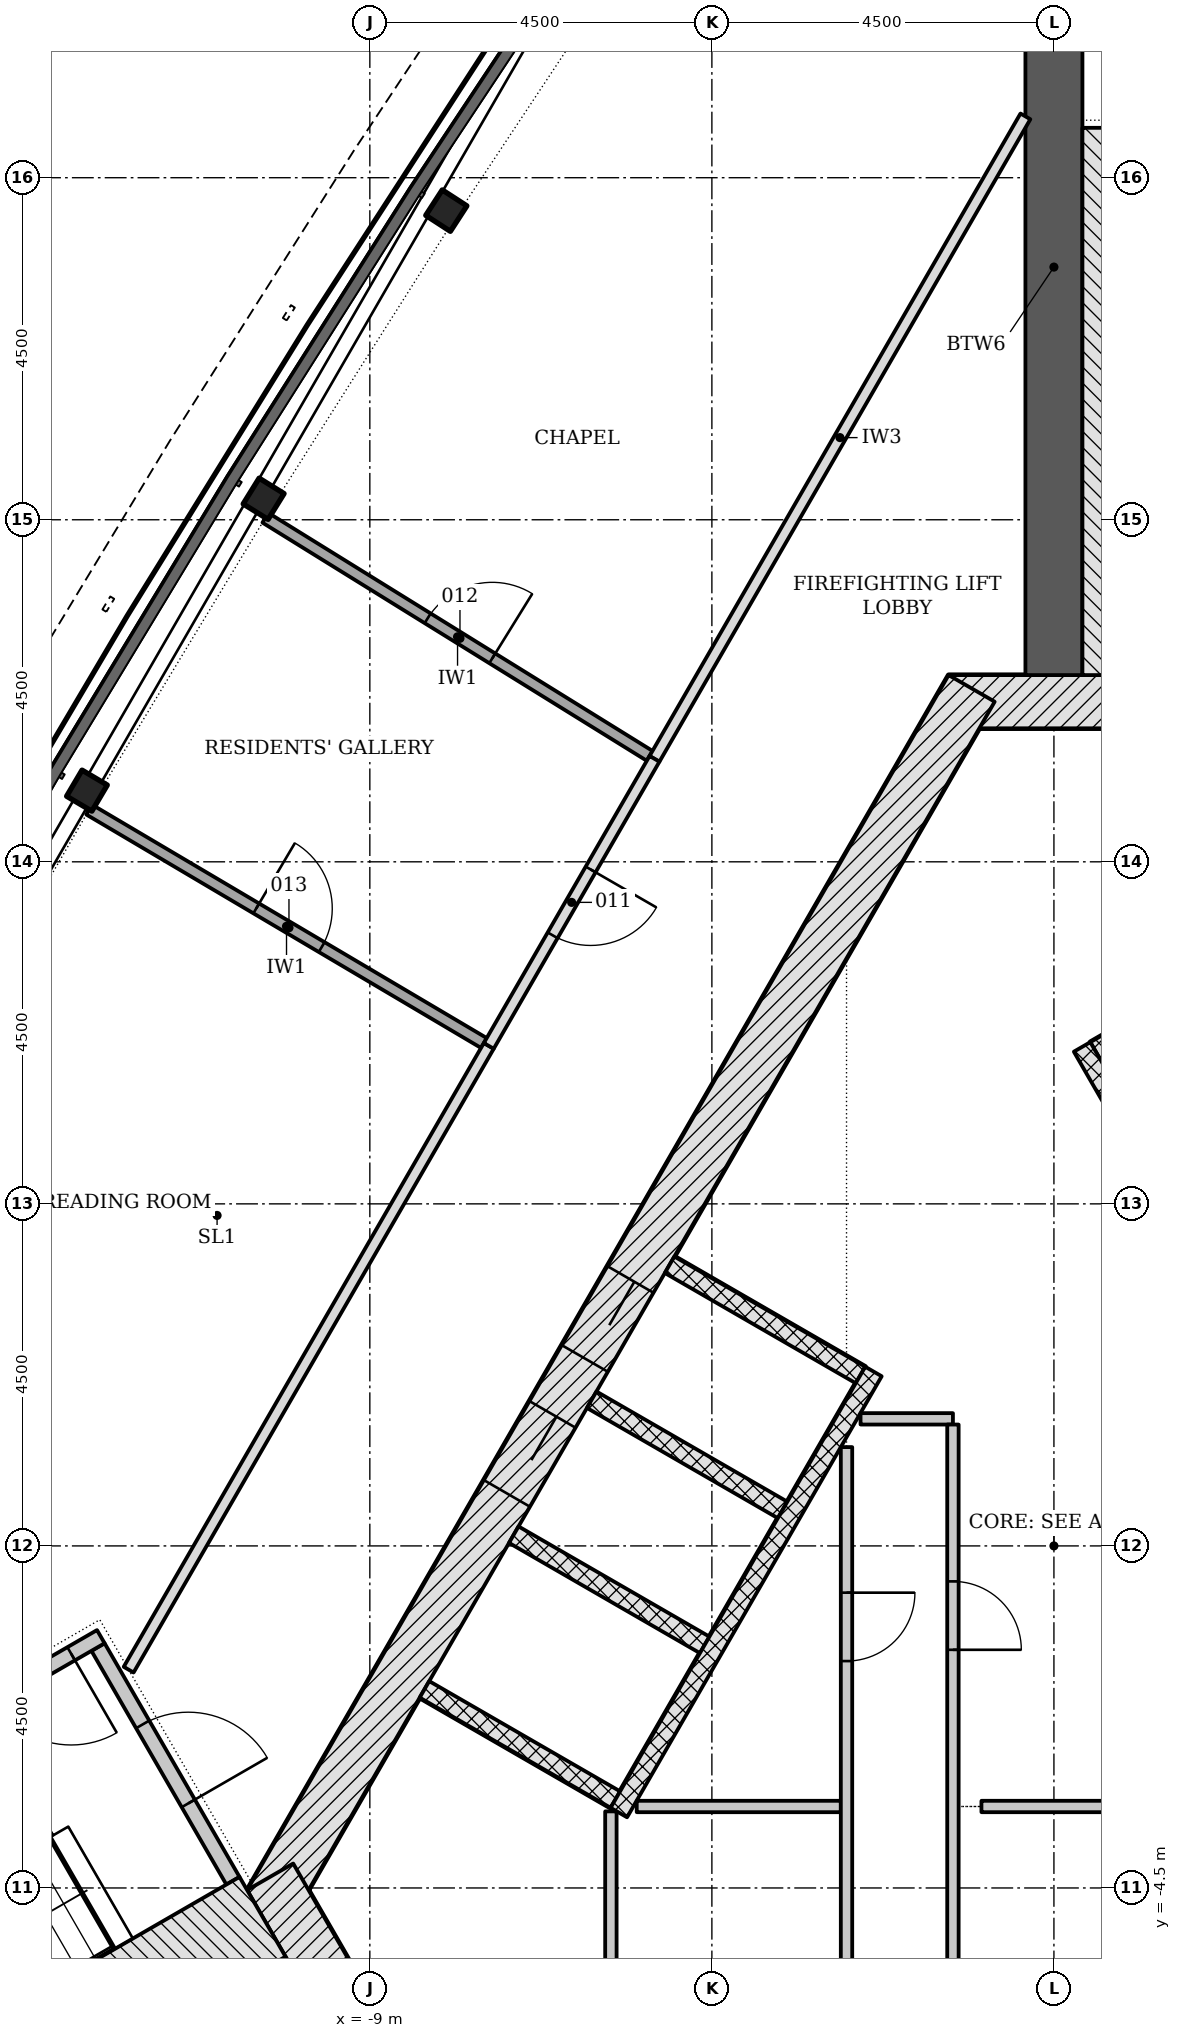
"""IFC4 building model, lengths in metres.
Left out: names, types, materials, properties, quantities, classifications, styles, units other than length and angle.
Written with IfcOpenShell. Run it as: python <this file> out.ifc"""

import sys

from ifc_helpers import new_model, si_unit, direction, frame, frame_2d, origin, origin_2d, place, context, subcontext, project, spatial, rectangle, i_section, extrude, element, fill, save


model = new_model("IFC4")
c1 = context("Model", 3, precision=1e-05, world=origin(), true_north=direction((0.0, 1.0)))
c2 = subcontext(c1, "Body", "Model", "MODEL_VIEW")
j1 = project(units=[si_unit("LENGTHUNIT", "METRE"), si_unit("PLANEANGLEUNIT", "RADIAN")], contexts=[c1])
p1 = place(None, origin())
s1 = spatial("IfcSite", under=j1, at=p1, CompositionType="ELEMENT")
p2 = place(p1, origin())
s2 = spatial("IfcBuilding", under=s1, at=p2, CompositionType="ELEMENT")
p3 = place(p2, frame((0.0, 0.0, 150.9)))
s3 = spatial("IfcBuildingStorey", under=s2, at=p3, CompositionType="ELEMENT", Elevation=150.9)
p4 = place(p3, frame((1.386, 11.106, -0.2), z_axis=(0.0, 0.0, 1.0), x_axis=(-1.0, 0.0, 0.0)))
e1 = element("IfcWall", 1, at=p4, inside=s3, PredefinedType="SHEAR", context=c2, shape_type="SweptSolid", body=[
    extrude(rectangle(XDim=2.771, YDim=0.7, at=frame_2d((1.386, 0.0))), origin(), (0.0, 0.0, 1.0), 3.6),
])
p5 = place(p3, frame((-1.083, 11.281, -0.2), z_axis=(0.0, 0.0, 1.0), x_axis=(-0.500001446645, -0.866024568562, 0.0)))
e2 = element("IfcWall", 2, at=p5, inside=s3, PredefinedType="SHEAR", context=c2, shape_type="SweptSolid", body=[
    extrude(rectangle(XDim=18.458, YDim=0.7, at=frame_2d((9.229, 0.0))), origin(), (0.0, 0.0, 1.0), 3.6),
])
p6 = place(p5, frame((8.979, 0.0, 0.2)))
e3 = element("IfcOpeningElement", 3, at=p6, cuts=e2, PredefinedType="OPENING", context=c2, shape_type="SweptSolid", body=[
    extrude(rectangle(XDim=1.2, YDim=2.1, at=frame_2d((0.6, 1.05))), frame((0.0, 0.36, 0.0), z_axis=(0.0, -1.0, 0.0), x_axis=(1.0, 0.0, 0.0)), (0.0, 0.0, 1.0), 0.72),
])
p7 = place(p5, frame((11.029, 0.0, 0.2)))
e4 = element("IfcOpeningElement", 4, at=p7, cuts=e2, PredefinedType="OPENING", context=c2, shape_type="SweptSolid", body=[
    extrude(rectangle(XDim=1.2, YDim=2.1, at=frame_2d((0.6, 1.05))), frame((0.0, 0.36, 0.0), z_axis=(0.0, -1.0, 0.0), x_axis=(1.0, 0.0, 0.0)), (0.0, 0.0, 1.0), 0.72),
])
p8 = place(p3, frame((-10.311, -4.353, -0.2), z_axis=(0.0, 0.0, 1.0), x_axis=(0.500042739161, -0.866000726912, 0.0)))
e5 = element("IfcWall", 5, at=p8, inside=s3, PredefinedType="SHEAR", context=c2, shape_type="SweptSolid", body=[
    extrude(rectangle(XDim=2.771, YDim=0.7, at=frame_2d((1.386, 0.0))), origin(), (0.0, 0.0, 1.0), 3.6),
])
p9 = place(p3, frame((0.0, 11.456, -0.2), z_axis=(0.0, 0.0, 1.0), x_axis=(0.0, 1.0, 0.0)))
e6 = element("IfcWall", 6, at=p9, inside=s3, PredefinedType="SHEAR", context=c2, shape_type="SweptSolid", body=[
    extrude(rectangle(XDim=10.736, YDim=0.75, at=frame_2d((5.368, 0.0))), origin(), (0.0, 0.0, 1.0), 3.6),
])
p10 = place(p3, frame((-9.922, -5.728, -0.2), z_axis=(0.0, 0.0, 1.0), x_axis=(-0.86602614826, -0.499998710529, 0.0)))
e7 = element("IfcWall", 7, at=p10, inside=s3, PredefinedType="SHEAR", context=c2, shape_type="SweptSolid", body=[
    extrude(rectangle(XDim=10.735, YDim=0.75, at=frame_2d((5.368, 0.0))), origin(), (0.0, 0.0, 1.0), 3.6),
])
for number, where, z_axis, x_axis in (
    (8, (-7.994, 17.567, -0.2), (0.0, 0.0, 1.0), (-0.544, -0.839, 0.0)),
    (9, (-10.397, 13.776, -0.2), (0.0, 0.0, 1.0), (-0.527, -0.85, 0.0)),
    (10, (-12.722, 9.936, -0.2), (0.0, 0.0, 1.0), (-0.509, -0.861, 0.0)),
):
    element("IfcColumn", number, at=place(p3, frame(where, z_axis=z_axis, x_axis=x_axis)), inside=s3, PredefinedType="COLUMN", context=c2, shape_type="SweptSolid", body=[
        extrude(i_section(OverallWidth=0.399, OverallDepth=0.386, WebThickness=0.021, FlangeThickness=0.033, FilletRadius=0.015, at=origin_2d()), origin(), (0.0, 0.0, 1.0), 3.6),
    ])
p11 = place(p3, frame((2.706, 7.769, -0.2), z_axis=(0.0, 0.0, 1.0), x_axis=(-0.866022959057, -0.500004234368, 0.0)))
e11 = element("IfcWall", 11, at=p11, inside=s3, PredefinedType="PARTITIONING", context=c2, shape_type="SweptSolid", body=[
    extrude(rectangle(XDim=2.5, YDim=0.25, at=frame_2d((1.25, 0.0))), origin(), (0.0, 0.0, 1.0), 3.6),
])
p12 = place(p3, frame((5.87, -2.961, 0.0), z_axis=(0.0, 0.0, 1.0), x_axis=(-0.50000615651, 0.866021849293, 0.0)))
e12 = element("IfcWall", 12, at=p12, inside=s3, PredefinedType="PARTITIONING", context=c2, shape_type="SweptSolid", body=[
    extrude(rectangle(XDim=11.0, YDim=0.25, at=frame_2d((5.5, 0.0))), origin(), (0.0, 0.0, 1.0), 3.4),
])
for number, where, z_axis, x_axis in (
    (13, (-5.056, 3.699, -0.2), (0.0, 0.0, 1.0), (0.866, -0.5, 0.0)),
    (14, (-6.081, 1.923, -0.2), (0.0, 0.0, 1.0), (0.866, -0.5, 0.0)),
    (15, (-7.106, 0.148, -0.2), (0.0, 0.0, 1.0), (0.866, -0.5, 0.0)),
    (16, (-8.281, -1.887, -0.2), (0.0, 0.0, 1.0), (0.866, -0.5, 0.0)),
):
    element("IfcWall", number, at=place(p3, frame(where, z_axis=z_axis, x_axis=x_axis)), inside=s3, PredefinedType="PARTITIONING", context=c2, shape_type="SweptSolid", body=[
        extrude(rectangle(XDim=2.9, YDim=0.25, at=frame_2d((1.45, 0.0))), origin(), (0.0, 0.0, 1.0), 3.6),
    ])
p13 = place(p3, frame((-2.374, 2.294, 0.0), z_axis=(0.0, 0.0, 1.0), x_axis=(-0.500003174267, -0.866023571113, 0.0)))
e17 = element("IfcWall", 17, at=p13, inside=s3, PredefinedType="PARTITIONING", context=c2, shape_type="SweptSolid", body=[
    extrude(rectangle(XDim=6.7, YDim=0.25, at=frame_2d((3.35, 0.0))), origin(), (0.0, 0.0, 1.0), 3.4),
])
p14 = place(p3, frame((-5.829, -3.492, 0.0), z_axis=(0.0, 0.0, 1.0), x_axis=(0.0, -1.0, 0.0)))
e18 = element("IfcWall", 18, at=p14, inside=s3, PredefinedType="PARTITIONING", context=c2, shape_type="SweptSolid", body=[
    extrude(rectangle(XDim=2.736, YDim=0.15, at=frame_2d((1.368, 0.0))), origin(), (0.0, 0.0, 1.0), 3.4),
])
p15 = place(p3, frame((-5.489, -3.428, 0.0), z_axis=(0.0, 0.0, 1.0), x_axis=(1.0, 0.0, 0.0)))
e19 = element("IfcWall", 19, at=p15, inside=s3, PredefinedType="PARTITIONING", context=c2, shape_type="SweptSolid", body=[
    extrude(rectangle(XDim=2.685, YDim=0.15, at=frame_2d((1.343, 0.0))), origin(), (0.0, 0.0, 1.0), 3.4),
])
p16 = place(p3, frame((-2.729, 1.3, 0.0), z_axis=(0.0, 0.0, 1.0), x_axis=(0.0, -1.0, 0.0)))
e20 = element("IfcWall", 20, at=p16, inside=s3, PredefinedType="PARTITIONING", context=c2, shape_type="SweptSolid", body=[
    extrude(rectangle(XDim=7.528, YDim=0.15, at=frame_2d((3.764, 0.0))), origin(), (0.0, 0.0, 1.0), 3.4),
])
p17 = place(p16, frame((1.915, 0.0, 0.0)))
e21 = element("IfcOpeningElement", 21, at=p17, cuts=e20, PredefinedType="OPENING", context=c2, shape_type="SweptSolid", body=[
    extrude(rectangle(XDim=0.9, YDim=2.1, at=frame_2d((0.45, 1.05))), frame((0.0, 0.085, 0.0), z_axis=(0.0, -1.0, 0.0), x_axis=(1.0, 0.0, 0.0)), (0.0, 0.0, 1.0), 0.17),
])
p18 = place(p3, frame((-2.544, 1.672, 0.0), z_axis=(0.0, 0.0, 1.0), x_axis=(1.0, 0.0, 0.0)))
e22 = element("IfcWall", 22, at=p18, inside=s3, PredefinedType="PARTITIONING", context=c2, shape_type="SweptSolid", body=[
    extrude(rectangle(XDim=1.216, YDim=0.15, at=frame_2d((0.608, 0.0))), origin(), (0.0, 0.0, 1.0), 3.4),
])
p19 = place(p3, frame((-1.329, 1.597, 0.0), z_axis=(0.0, 0.0, 1.0), x_axis=(0.0, -1.0, 0.0)))
e23 = element("IfcWall", 23, at=p19, inside=s3, PredefinedType="PARTITIONING", context=c2, shape_type="SweptSolid", body=[
    extrude(rectangle(XDim=7.825, YDim=0.15, at=frame_2d((3.913, 0.0))), origin(), (0.0, 0.0, 1.0), 3.4),
])
p20 = place(p19, frame((2.063, 0.0, 0.0)))
e24 = element("IfcOpeningElement", 24, at=p20, cuts=e23, PredefinedType="OPENING", context=c2, shape_type="SweptSolid", body=[
    extrude(rectangle(XDim=0.9, YDim=2.1, at=frame_2d((0.45, 1.05))), frame((0.0, 0.085, 0.0), z_axis=(0.0, -1.0, 0.0), x_axis=(1.0, 0.0, 0.0)), (0.0, 0.0, 1.0), 0.17),
])
p21 = place(p3, frame((-0.954, -3.428, 0.0), z_axis=(0.0, 0.0, 1.0), x_axis=(1.0, 0.0, 0.0)))
e25 = element("IfcWall", 25, at=p21, inside=s3, PredefinedType="PARTITIONING", context=c2, shape_type="SweptSolid", body=[
    extrude(rectangle(XDim=10.08, YDim=0.15, at=frame_2d((5.04, 0.0))), origin(), (0.0, 0.0, 1.0), 3.4),
])
p22 = place(p3, frame((0.98, 11.456, -0.2), z_axis=(0.0, 0.0, 1.0), x_axis=(0.0, 1.0, 0.0)))
e26 = element("IfcWall", 26, at=p22, inside=s3, PredefinedType="SHEAR", context=c2, shape_type="SweptSolid", body=[
    extrude(rectangle(XDim=7.2, YDim=1.211, at=frame_2d((3.6, 0.0))), origin(), (0.0, 0.0, 1.0), 3.6),
])
p23 = place(p3, frame((-12.576, -1.331, -0.2), z_axis=(0.0, 0.0, 1.0), x_axis=(0.499970499736, -0.8660424351, 0.0)))
e27 = element("IfcWall", 27, at=p23, inside=s3, PredefinedType="SHEAR", context=c2, shape_type="SweptSolid", body=[
    extrude(rectangle(XDim=3.55, YDim=0.2, at=frame_2d((1.775, 0.0))), origin(), (0.0, 0.0, 1.0), 3.6),
])
p24 = place(p23, frame((1.175, 0.0, 0.2)))
e28 = element("IfcOpeningElement", 28, at=p24, cuts=e27, PredefinedType="OPENING", context=c2, shape_type="SweptSolid", body=[
    extrude(rectangle(XDim=1.2, YDim=2.1, at=frame_2d((0.6, 1.05))), frame((0.0, 0.11, 0.0), z_axis=(0.0, -1.0, 0.0), x_axis=(1.0, 0.0, 0.0)), (0.0, 0.0, 1.0), 0.22),
])
p25 = place(p3, frame((-12.539, -1.194, -0.2), z_axis=(0.0, 0.0, 1.0), x_axis=(-0.866045472092, -0.499965239061, 0.0)))
e29 = element("IfcWall", 29, at=p25, inside=s3, PredefinedType="SHEAR", context=c2, shape_type="SweptSolid", body=[
    extrude(rectangle(XDim=5.6, YDim=0.2, at=frame_2d((2.8, 0.0))), origin(), (0.0, 0.0, 1.0), 3.6),
])
p26 = place(p25, frame((0.45, 0.0, 0.2)))
e30 = element("IfcOpeningElement", 30, at=p26, cuts=e29, PredefinedType="OPENING", context=c2, shape_type="SweptSolid", body=[
    extrude(rectangle(XDim=1.2, YDim=2.1, at=frame_2d((0.6, 1.05))), frame((0.0, 0.11, 0.0), z_axis=(0.0, -1.0, 0.0), x_axis=(1.0, 0.0, 0.0)), (0.0, 0.0, 1.0), 0.22),
])
p27 = place(p3, frame((-10.412, -4.879, -0.2), z_axis=(0.0, 0.0, 1.0), x_axis=(-0.866026919366, -0.499997374926, 0.0)))
e31 = element("IfcWall", 31, at=p27, inside=s3, PredefinedType="SHEAR", context=c2, shape_type="SweptSolid", body=[
    extrude(rectangle(XDim=7.2, YDim=1.211, at=frame_2d((3.6, 0.0))), origin(), (0.0, 0.0, 1.0), 3.6),
])
p28 = place(p3, frame((-0.375, 18.807, 0.0), z_axis=(0.0, 0.0, 1.0), x_axis=(-0.500002508028, -0.866023955769, 0.0)))
e32 = element("IfcWall", 32, at=p28, inside=s3, PredefinedType="PARTITIONING", context=c2, shape_type="SweptSolid", body=[
    extrude(rectangle(XDim=9.76, YDim=0.15, at=frame_2d((4.88, 0.0))), origin(), (0.0, 0.0, 1.0), 2.847),
])
p29 = place(p3, frame((-7.435, 6.578, 0.0), z_axis=(0.0, 0.0, 1.0), x_axis=(-0.499998996204, -0.866025983326, 0.0)))
e33 = element("IfcWall", 33, at=p29, inside=s3, PredefinedType="PARTITIONING", context=c2, shape_type="SweptSolid", body=[
    extrude(rectangle(XDim=9.476, YDim=0.15, at=frame_2d((4.738, 0.0))), origin(), (0.0, 0.0, 1.0), 2.847),
])
p30 = place(p3, frame((-10.374, 13.526, 0.0), z_axis=(0.0, 0.0, 1.0), x_axis=(0.85006997005, -0.526669769418, 0.0)))
e34 = element("IfcWall", 34, at=p30, inside=s3, PredefinedType="PARTITIONING", context=c2, shape_type="SweptSolid", body=[
    extrude(rectangle(XDim=5.947, YDim=0.15, at=frame_2d((2.973, 0.0))), origin(), (0.0, 0.0, 1.0), 3.4),
])
p31 = place(p30, frame((2.511, 0.0, 0.0)))
e35 = element("IfcOpeningElement", 35, at=p31, cuts=e34, PredefinedType="OPENING", context=c2, shape_type="SweptSolid", body=[
    extrude(rectangle(XDim=1.0, YDim=2.1, at=frame_2d((0.5, 1.05))), frame((0.0, 0.085, 0.0), z_axis=(0.0, -1.0, 0.0), x_axis=(1.0, 0.0, 0.0)), (0.0, 0.0, 1.0), 0.17),
])
p32 = place(p3, frame((-12.693, 9.687, 0.0), z_axis=(0.0, 0.0, 1.0), x_axis=(0.860795979621, -0.508950175821, 0.0)))
e36 = element("IfcWall", 36, at=p32, inside=s3, PredefinedType="PARTITIONING", context=c2, shape_type="SweptSolid", body=[
    extrude(rectangle(XDim=6.033, YDim=0.15, at=frame_2d((3.016, 0.0))), origin(), (0.0, 0.0, 1.0), 3.4),
])
p33 = place(p32, frame((2.554, 0.0, 0.0)))
e37 = element("IfcOpeningElement", 37, at=p33, cuts=e36, PredefinedType="OPENING", context=c2, shape_type="SweptSolid", body=[
    extrude(rectangle(XDim=1.0, YDim=2.1, at=frame_2d((0.5, 1.05))), frame((0.0, 0.085, 0.0), z_axis=(0.0, -1.0, 0.0), x_axis=(1.0, 0.0, 0.0)), (0.0, 0.0, 1.0), 0.17),
])
p34 = place(p3, frame((-5.255, 10.355, 0.0), z_axis=(0.0, 0.0, 1.0), x_axis=(-0.499980937175, -0.866036409432, 0.0)))
e38 = element("IfcWall", 38, at=p34, inside=s3, PredefinedType="PARTITIONING", context=c2, shape_type="SweptSolid", body=[
    extrude(rectangle(XDim=4.361, YDim=0.15, at=frame_2d((2.18, 0.0))), origin(), (0.0, 0.0, 1.0), 2.847),
])
p35 = place(p34, frame((1.68, 0.0, 0.0)))
e39 = element("IfcOpeningElement", 39, at=p35, cuts=e38, PredefinedType="OPENING", context=c2, shape_type="SweptSolid", body=[
    extrude(rectangle(XDim=1.0, YDim=2.1, at=frame_2d((0.5, 1.05))), frame((0.0, 0.085, 0.0), z_axis=(0.0, -1.0, 0.0), x_axis=(1.0, 0.0, 0.0)), (0.0, 0.0, 1.0), 0.17),
])
p36 = place(p6, origin())
e40 = element("IfcDoor", 40, at=p36, inside=s3, OperationType="DOUBLE_DOOR_SLIDING", PredefinedType="DOOR", context=c2, shape_type="SweptSolid", body=[
    extrude(rectangle(XDim=1.2, YDim=2.1, at=frame_2d((0.6, 1.05))), frame((0.0, 0.025, 0.0), z_axis=(0.0, -1.0, 0.0), x_axis=(1.0, 0.0, 0.0)), (0.0, 0.0, 1.0), 0.05),
])
fill(e3, e40)
p37 = place(p7, origin())
e41 = element("IfcDoor", 41, at=p37, inside=s3, OperationType="DOUBLE_DOOR_SLIDING", PredefinedType="DOOR", context=c2, shape_type="SweptSolid", body=[
    extrude(rectangle(XDim=1.2, YDim=2.1, at=frame_2d((0.6, 1.05))), frame((0.0, 0.025, 0.0), z_axis=(0.0, -1.0, 0.0), x_axis=(1.0, 0.0, 0.0)), (0.0, 0.0, 1.0), 0.05),
])
fill(e4, e41)
p38 = place(p17, origin())
e42 = element("IfcDoor", 42, at=p38, inside=s3, OperationType="SINGLE_SWING_LEFT", PredefinedType="DOOR", context=c2, shape_type="SweptSolid", body=[
    extrude(rectangle(XDim=0.9, YDim=2.1, at=frame_2d((0.45, 1.05))), frame((0.0, 0.025, 0.0), z_axis=(0.0, -1.0, 0.0), x_axis=(1.0, 0.0, 0.0)), (0.0, 0.0, 1.0), 0.05),
])
fill(e21, e42)
p39 = place(p20, origin())
e43 = element("IfcDoor", 43, at=p39, inside=s3, OperationType="SINGLE_SWING_RIGHT", PredefinedType="DOOR", context=c2, shape_type="SweptSolid", body=[
    extrude(rectangle(XDim=0.9, YDim=2.1, at=frame_2d((0.45, 1.05))), frame((0.0, 0.025, 0.0), z_axis=(0.0, -1.0, 0.0), x_axis=(1.0, 0.0, 0.0)), (0.0, 0.0, 1.0), 0.05),
])
fill(e24, e43)
p40 = place(p24, origin())
e44 = element("IfcDoor", 44, at=p40, inside=s3, OperationType="SINGLE_SWING_RIGHT", PredefinedType="DOOR", context=c2, shape_type="SweptSolid", body=[
    extrude(rectangle(XDim=1.2, YDim=2.1, at=frame_2d((0.6, 1.05))), frame((0.0, 0.025, 0.0), z_axis=(0.0, -1.0, 0.0), x_axis=(1.0, 0.0, 0.0)), (0.0, 0.0, 1.0), 0.05),
])
fill(e28, e44)
p41 = place(p26, origin())
e45 = element("IfcDoor", 45, at=p41, inside=s3, OperationType="SINGLE_SWING_LEFT", PredefinedType="DOOR", context=c2, shape_type="SweptSolid", body=[
    extrude(rectangle(XDim=1.2, YDim=2.1, at=frame_2d((0.6, 1.05))), frame((0.0, 0.025, 0.0), z_axis=(0.0, -1.0, 0.0), x_axis=(1.0, 0.0, 0.0)), (0.0, 0.0, 1.0), 0.05),
])
fill(e30, e45)
p42 = place(p35, origin())
e46 = element("IfcDoor", 46, at=p42, inside=s3, OperationType="SINGLE_SWING_LEFT", PredefinedType="DOOR", context=c2, shape_type="SweptSolid", body=[
    extrude(rectangle(XDim=1.0, YDim=2.1, at=frame_2d((0.5, 1.05))), frame((0.0, 0.025, 0.0), z_axis=(0.0, -1.0, 0.0), x_axis=(1.0, 0.0, 0.0)), (0.0, 0.0, 1.0), 0.05),
])
fill(e39, e46)
p43 = place(p31, origin())
e47 = element("IfcDoor", 47, at=p43, inside=s3, OperationType="SINGLE_SWING_RIGHT", PredefinedType="DOOR", context=c2, shape_type="SweptSolid", body=[
    extrude(rectangle(XDim=1.0, YDim=2.1, at=frame_2d((0.5, 1.05))), frame((0.0, 0.025, 0.0), z_axis=(0.0, -1.0, 0.0), x_axis=(1.0, 0.0, 0.0)), (0.0, 0.0, 1.0), 0.05),
])
fill(e35, e47)
p44 = place(p33, origin())
e48 = element("IfcDoor", 48, at=p44, inside=s3, OperationType="SINGLE_SWING_LEFT", PredefinedType="DOOR", context=c2, shape_type="SweptSolid", body=[
    extrude(rectangle(XDim=1.0, YDim=2.1, at=frame_2d((0.5, 1.05))), frame((0.0, 0.025, 0.0), z_axis=(0.0, -1.0, 0.0), x_axis=(1.0, 0.0, 0.0)), (0.0, 0.0, 1.0), 0.05),
])
fill(e37, e48)
save(model, sys.argv[1])
